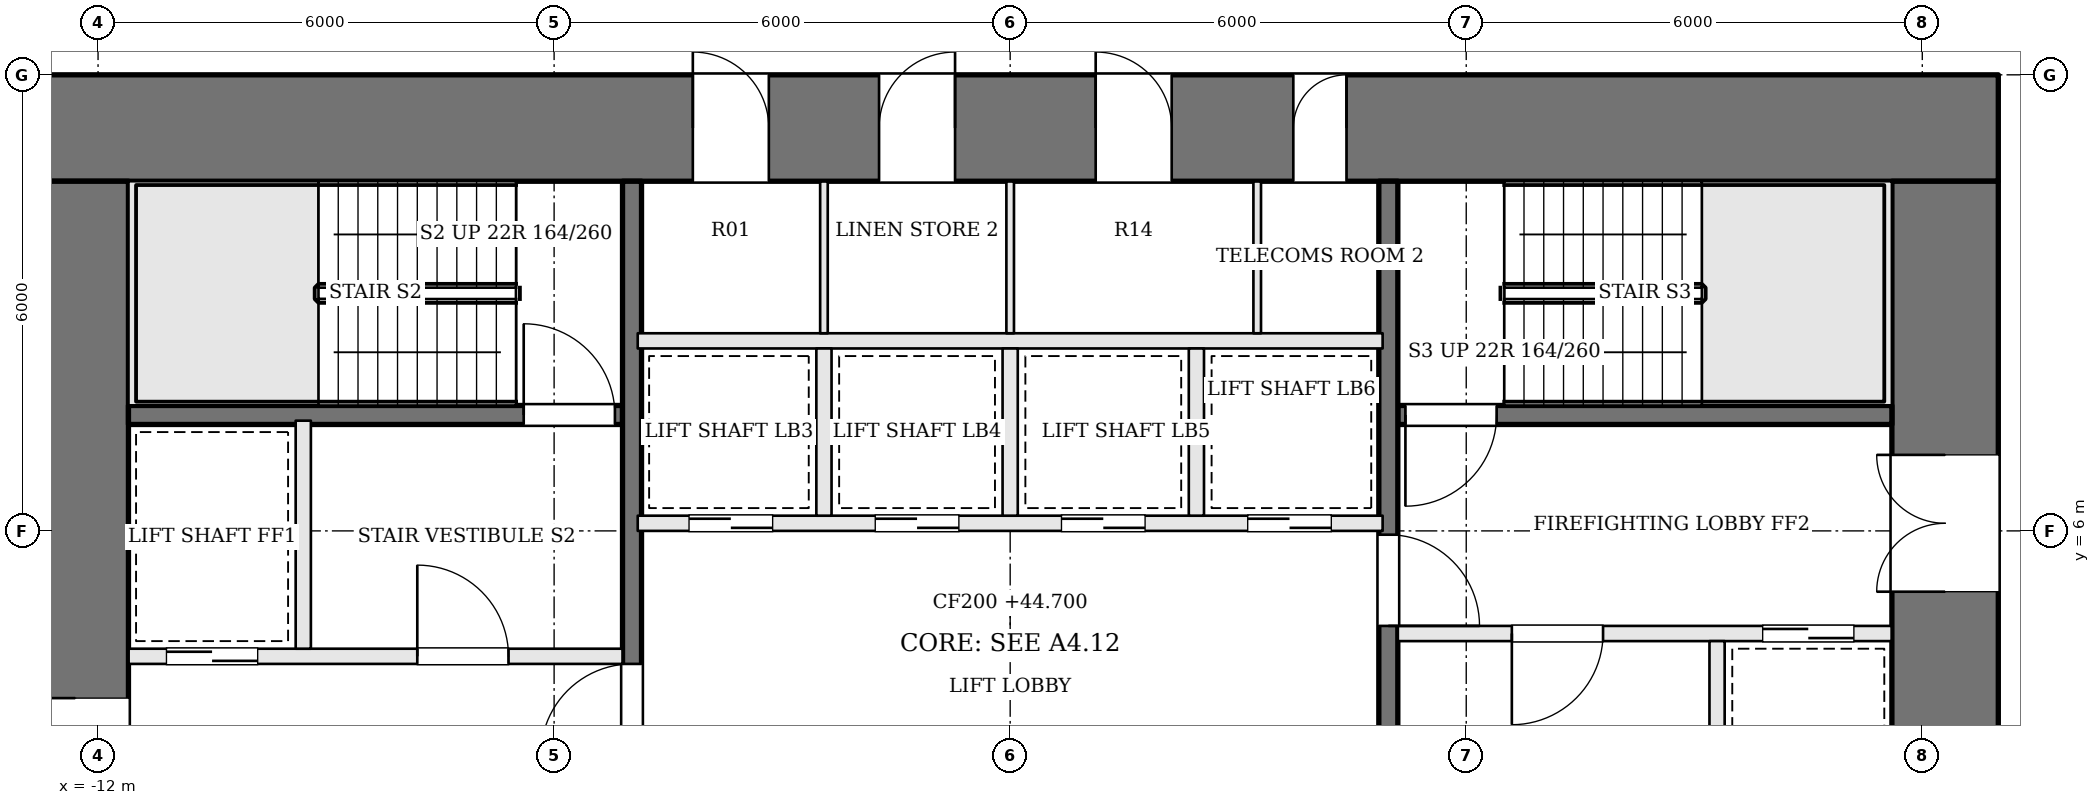
"""IFC4 building model, lengths in metres.
Left out: names, types, materials, properties, quantities, classifications, styles, units other than length and angle.
Written with IfcOpenShell. Run it as: python <this file> out.ifc"""

import sys

from ifc_helpers import new_model, si_unit, direction, frame, frame_2d, origin, place, context, subcontext, project, spatial, rectangle, extrude, element, fill, save


model = new_model("IFC4")
c1 = context("Model", 3, precision=1e-05, world=origin(), true_north=direction((0.0, 1.0)))
c2 = subcontext(c1, "Body", "Model", "MODEL_VIEW")
j1 = project(units=[si_unit("LENGTHUNIT", "METRE"), si_unit("PLANEANGLEUNIT", "RADIAN")], contexts=[c1])
p1 = place(None, origin())
s1 = spatial("IfcSite", under=j1, at=p1, CompositionType="ELEMENT")
p2 = place(p1, origin())
s2 = spatial("IfcBuilding", under=s1, at=p2, CompositionType="ELEMENT")
p3 = place(p2, frame((0.0, 0.0, 44.7)))
s3 = spatial("IfcBuildingStorey", under=s2, at=p3, CompositionType="ELEMENT", Elevation=44.7)
p4 = place(p3, frame((-13.0, 11.3, 0.0), z_axis=(0.0, 0.0, 1.0), x_axis=(1.0, 0.0, 0.0)))
e1 = element("IfcWall", 1, at=p4, inside=s3, PredefinedType="SHEAR", context=c2, shape_type="SweptSolid", body=[
    extrude(rectangle(XDim=26.0, YDim=1.4, at=frame_2d((13.0, 0.0))), origin(), (0.0, 0.0, 1.0), 3.6),
])
p5 = place(p4, frame((8.825, 0.0, 0.0)))
e2 = element("IfcOpeningElement", 2, at=p5, cuts=e1, PredefinedType="OPENING", context=c2, shape_type="SweptSolid", body=[
    extrude(rectangle(XDim=1.0, YDim=2.1, at=frame_2d((0.5, 1.05))), frame((0.0, 0.71, 0.0), z_axis=(0.0, -1.0, 0.0), x_axis=(1.0, 0.0, 0.0)), (0.0, 0.0, 1.0), 1.42),
])
p6 = place(p4, frame((11.275, 0.0, 0.0)))
e3 = element("IfcOpeningElement", 3, at=p6, cuts=e1, PredefinedType="OPENING", context=c2, shape_type="SweptSolid", body=[
    extrude(rectangle(XDim=1.0, YDim=2.1, at=frame_2d((0.5, 1.05))), frame((0.0, 0.71, 0.0), z_axis=(0.0, -1.0, 0.0), x_axis=(1.0, 0.0, 0.0)), (0.0, 0.0, 1.0), 1.42),
])
p7 = place(p4, frame((14.125, 0.0, 0.0)))
e4 = element("IfcOpeningElement", 4, at=p7, cuts=e1, PredefinedType="OPENING", context=c2, shape_type="SweptSolid", body=[
    extrude(rectangle(XDim=1.0, YDim=2.1, at=frame_2d((0.5, 1.05))), frame((0.0, 0.71, 0.0), z_axis=(0.0, -1.0, 0.0), x_axis=(1.0, 0.0, 0.0)), (0.0, 0.0, 1.0), 1.42),
])
p8 = place(p4, frame((16.725, 0.0, 0.0)))
e5 = element("IfcOpeningElement", 5, at=p8, cuts=e1, PredefinedType="OPENING", context=c2, shape_type="SweptSolid", body=[
    extrude(rectangle(XDim=0.7, YDim=2.1, at=frame_2d((0.35, 1.05))), frame((0.0, 0.71, 0.0), z_axis=(0.0, -1.0, 0.0), x_axis=(1.0, 0.0, 0.0)), (0.0, 0.0, 1.0), 1.42),
])
p9 = place(p3, frame((12.3, -1.6, 0.0), z_axis=(0.0, 0.0, 1.0), x_axis=(0.0, 1.0, 0.0)))
e6 = element("IfcWall", 6, at=p9, inside=s3, PredefinedType="SHEAR", context=c2, shape_type="SweptSolid", body=[
    extrude(rectangle(XDim=12.2, YDim=1.4, at=frame_2d((6.1, 0.0))), origin(), (0.0, 0.0, 1.0), 3.6),
])
p10 = place(p9, frame((6.8, 0.0, 0.0)))
e7 = element("IfcOpeningElement", 7, at=p10, cuts=e6, PredefinedType="OPENING", context=c2, shape_type="SweptSolid", body=[
    extrude(rectangle(XDim=1.8, YDim=2.1, at=frame_2d((0.9, 1.05))), frame((0.0, 0.71, 0.0), z_axis=(0.0, -1.0, 0.0), x_axis=(1.0, 0.0, 0.0)), (0.0, 0.0, 1.0), 1.42),
])
p11 = place(p3, frame((-12.3, -1.6, 0.0), z_axis=(0.0, 0.0, 1.0), x_axis=(0.0, 1.0, 0.0)))
e8 = element("IfcWall", 8, at=p11, inside=s3, PredefinedType="SHEAR", context=c2, shape_type="SweptSolid", body=[
    extrude(rectangle(XDim=12.2, YDim=1.4, at=frame_2d((6.1, 0.0))), origin(), (0.0, 0.0, 1.0), 3.6),
])
p12 = place(p11, frame((3.6, 0.0, 0.0)))
e9 = element("IfcOpeningElement", 9, at=p12, cuts=e8, PredefinedType="OPENING", context=c2, shape_type="SweptSolid", body=[
    extrude(rectangle(XDim=1.8, YDim=2.1, at=frame_2d((0.9, 1.05))), frame((0.0, 0.71, 0.0), z_axis=(0.0, -1.0, 0.0), x_axis=(1.0, 0.0, 0.0)), (0.0, 0.0, 1.0), 1.42),
])
p13 = place(p3, frame((11.6, 7.525, 0.0), z_axis=(0.0, 0.0, 1.0), x_axis=(-1.0, 0.0, 0.0)))
e10 = element("IfcWall", 10, at=p13, inside=s3, PredefinedType="SOLIDWALL", context=c2, shape_type="SweptSolid", body=[
    extrude(rectangle(XDim=6.5, YDim=0.25, at=frame_2d((3.25, 0.0))), origin(), (0.0, 0.0, 1.0), 3.4),
])
p14 = place(p13, frame((5.2, 0.0, 0.0)))
e11 = element("IfcOpeningElement", 11, at=p14, cuts=e10, PredefinedType="OPENING", context=c2, shape_type="SweptSolid", body=[
    extrude(rectangle(XDim=1.2, YDim=2.1, at=frame_2d((0.6, 1.05))), frame((0.0, 0.135, 0.0), z_axis=(0.0, -1.0, 0.0), x_axis=(1.0, 0.0, 0.0)), (0.0, 0.0, 1.0), 0.27),
])
p15 = place(p3, frame((-11.6, 4.35, 0.0), z_axis=(0.0, 0.0, 1.0), x_axis=(1.0, 0.0, 0.0)))
e12 = element("IfcWall", 12, at=p15, inside=s3, PredefinedType="SOLIDWALL", context=c2, shape_type="SweptSolid", body=[
    extrude(rectangle(XDim=6.5, YDim=0.2, at=frame_2d((3.25, 0.0))), origin(), (0.0, 0.0, 1.0), 3.4),
])
p16 = place(p15, frame((3.8, 0.0, 0.0)))
e13 = element("IfcOpeningElement", 13, at=p16, cuts=e12, PredefinedType="OPENING", context=c2, shape_type="SweptSolid", body=[
    extrude(rectangle(XDim=1.2, YDim=2.1, at=frame_2d((0.6, 1.05))), frame((0.0, 0.11, 0.0), z_axis=(0.0, -1.0, 0.0), x_axis=(1.0, 0.0, 0.0)), (0.0, 0.0, 1.0), 0.22),
])
p17 = place(p15, frame((0.5, 0.0, 0.0)))
e14 = element("IfcOpeningElement", 14, at=p17, cuts=e12, PredefinedType="OPENING", context=c2, shape_type="SweptSolid", body=[
    extrude(rectangle(XDim=1.2, YDim=2.1, at=frame_2d((0.6, 1.05))), frame((0.0, 0.11, 0.0), z_axis=(0.0, -1.0, 0.0), x_axis=(1.0, 0.0, 0.0)), (0.0, 0.0, 1.0), 0.22),
])
p18 = place(p3, frame((11.6, 4.65, 0.0), z_axis=(0.0, 0.0, 1.0), x_axis=(-1.0, 0.0, 0.0)))
e15 = element("IfcWall", 15, at=p18, inside=s3, PredefinedType="SOLIDWALL", context=c2, shape_type="SweptSolid", body=[
    extrude(rectangle(XDim=6.5, YDim=0.2, at=frame_2d((3.25, 0.0))), origin(), (0.0, 0.0, 1.0), 3.4),
])
p19 = place(p18, frame((3.8, 0.0, 0.0)))
e16 = element("IfcOpeningElement", 16, at=p19, cuts=e15, PredefinedType="OPENING", context=c2, shape_type="SweptSolid", body=[
    extrude(rectangle(XDim=1.2, YDim=2.1, at=frame_2d((0.6, 1.05))), frame((0.0, 0.11, 0.0), z_axis=(0.0, -1.0, 0.0), x_axis=(1.0, 0.0, 0.0)), (0.0, 0.0, 1.0), 0.22),
])
p20 = place(p18, frame((0.5, 0.0, 0.0)))
e17 = element("IfcOpeningElement", 17, at=p20, cuts=e15, PredefinedType="OPENING", context=c2, shape_type="SweptSolid", body=[
    extrude(rectangle(XDim=1.2, YDim=2.1, at=frame_2d((0.6, 1.05))), frame((0.0, 0.11, 0.0), z_axis=(0.0, -1.0, 0.0), x_axis=(1.0, 0.0, 0.0)), (0.0, 0.0, 1.0), 0.22),
])
p21 = place(p3, frame((-11.6, 7.525, 0.0), z_axis=(0.0, 0.0, 1.0), x_axis=(1.0, 0.0, 0.0)))
e18 = element("IfcWall", 18, at=p21, inside=s3, PredefinedType="SOLIDWALL", context=c2, shape_type="SweptSolid", body=[
    extrude(rectangle(XDim=6.5, YDim=0.25, at=frame_2d((3.25, 0.0))), origin(), (0.0, 0.0, 1.0), 3.4),
])
p22 = place(p21, frame((5.2, 0.0, 0.0)))
e19 = element("IfcOpeningElement", 19, at=p22, cuts=e18, PredefinedType="OPENING", context=c2, shape_type="SweptSolid", body=[
    extrude(rectangle(XDim=1.2, YDim=2.1, at=frame_2d((0.6, 1.05))), frame((0.0, 0.135, 0.0), z_axis=(0.0, -1.0, 0.0), x_axis=(1.0, 0.0, 0.0)), (0.0, 0.0, 1.0), 0.27),
])
for number, where, z_axis, x_axis in (
    (20, (-9.3, 4.45, 0.0), (0.0, 0.0, 1.0), (0.0, 1.0, 0.0)),
    (21, (9.3, 4.55, 0.0), (0.0, 0.0, 1.0), (0.0, -1.0, 0.0)),
):
    element("IfcWall", number, at=place(p3, frame(where, z_axis=z_axis, x_axis=x_axis)), inside=s3, PredefinedType="SOLIDWALL", context=c2, shape_type="SweptSolid", body=[
        extrude(rectangle(XDim=3.0, YDim=0.2, at=frame_2d((1.5, 0.0))), origin(), (0.0, 0.0, 1.0), 3.4),
    ])
p23 = place(p3, frame((-4.975, -1.6, 0.0), z_axis=(0.0, 0.0, 1.0), x_axis=(0.0, 1.0, 0.0)))
e22 = element("IfcWall", 22, at=p23, inside=s3, PredefinedType="SOLIDWALL", context=c2, shape_type="SweptSolid", body=[
    extrude(rectangle(XDim=12.2, YDim=0.25, at=frame_2d((6.1, 0.0))), origin(), (0.0, 0.0, 1.0), 3.4),
])
p24 = place(p23, frame((4.65, 0.0, 0.0)))
e23 = element("IfcOpeningElement", 23, at=p24, cuts=e22, PredefinedType="OPENING", context=c2, shape_type="SweptSolid", body=[
    extrude(rectangle(XDim=1.2, YDim=2.1, at=frame_2d((0.6, 1.05))), frame((0.0, 0.135, 0.0), z_axis=(0.0, -1.0, 0.0), x_axis=(1.0, 0.0, 0.0)), (0.0, 0.0, 1.0), 0.27),
])
p25 = place(p3, frame((4.975, 10.6, 0.0), z_axis=(0.0, 0.0, 1.0), x_axis=(0.0, -1.0, 0.0)))
e24 = element("IfcWall", 24, at=p25, inside=s3, PredefinedType="SOLIDWALL", context=c2, shape_type="SweptSolid", body=[
    extrude(rectangle(XDim=12.2, YDim=0.25, at=frame_2d((6.1, 0.0))), origin(), (0.0, 0.0, 1.0), 3.4),
])
p26 = place(p25, frame((4.65, 0.0, 0.0)))
e25 = element("IfcOpeningElement", 25, at=p26, cuts=e24, PredefinedType="OPENING", context=c2, shape_type="SweptSolid", body=[
    extrude(rectangle(XDim=1.2, YDim=2.1, at=frame_2d((0.6, 1.05))), frame((0.0, 0.135, 0.0), z_axis=(0.0, -1.0, 0.0), x_axis=(1.0, 0.0, 0.0)), (0.0, 0.0, 1.0), 0.27),
])
p27 = place(p3, frame((-4.9, 6.1, 0.0), z_axis=(0.0, 0.0, 1.0), x_axis=(1.0, 0.0, 0.0)))
e26 = element("IfcWall", 26, at=p27, inside=s3, PredefinedType="SOLIDWALL", context=c2, shape_type="SweptSolid", body=[
    extrude(rectangle(XDim=9.8, YDim=0.2, at=frame_2d((4.9, 0.0))), origin(), (0.0, 0.0, 1.0), 3.4),
])
p28 = place(p27, frame((0.675, 0.0, 0.0)))
e27 = element("IfcOpeningElement", 27, at=p28, cuts=e26, PredefinedType="OPENING", context=c2, shape_type="SweptSolid", body=[
    extrude(rectangle(XDim=1.1, YDim=2.1, at=frame_2d((0.55, 1.05))), frame((0.0, 0.11, 0.0), z_axis=(0.0, -1.0, 0.0), x_axis=(1.0, 0.0, 0.0)), (0.0, 0.0, 1.0), 0.22),
])
p29 = place(p27, frame((3.125, 0.0, 0.0)))
e28 = element("IfcOpeningElement", 28, at=p29, cuts=e26, PredefinedType="OPENING", context=c2, shape_type="SweptSolid", body=[
    extrude(rectangle(XDim=1.1, YDim=2.1, at=frame_2d((0.55, 1.05))), frame((0.0, 0.11, 0.0), z_axis=(0.0, -1.0, 0.0), x_axis=(1.0, 0.0, 0.0)), (0.0, 0.0, 1.0), 0.22),
])
p30 = place(p27, frame((5.575, 0.0, 0.0)))
e29 = element("IfcOpeningElement", 29, at=p30, cuts=e26, PredefinedType="OPENING", context=c2, shape_type="SweptSolid", body=[
    extrude(rectangle(XDim=1.1, YDim=2.1, at=frame_2d((0.55, 1.05))), frame((0.0, 0.11, 0.0), z_axis=(0.0, -1.0, 0.0), x_axis=(1.0, 0.0, 0.0)), (0.0, 0.0, 1.0), 0.22),
])
p31 = place(p27, frame((8.025, 0.0, 0.0)))
e30 = element("IfcOpeningElement", 30, at=p31, cuts=e26, PredefinedType="OPENING", context=c2, shape_type="SweptSolid", body=[
    extrude(rectangle(XDim=1.1, YDim=2.1, at=frame_2d((0.55, 1.05))), frame((0.0, 0.11, 0.0), z_axis=(0.0, -1.0, 0.0), x_axis=(1.0, 0.0, 0.0)), (0.0, 0.0, 1.0), 0.22),
])
p32 = place(p3, frame((-4.9, 8.5, 0.0), z_axis=(0.0, 0.0, 1.0), x_axis=(1.0, 0.0, 0.0)))
e31 = element("IfcWall", 31, at=p32, inside=s3, PredefinedType="SOLIDWALL", context=c2, shape_type="SweptSolid", body=[
    extrude(rectangle(XDim=9.8, YDim=0.2, at=frame_2d((4.9, 0.0))), origin(), (0.0, 0.0, 1.0), 3.4),
])
for number, where, z_axis, x_axis in (
    (32, (-2.45, 6.2, 0.0), (0.0, 0.0, 1.0), (0.0, 1.0, 0.0)),
    (33, (0.0, 6.2, 0.0), (0.0, 0.0, 1.0), (0.0, 1.0, 0.0)),
    (34, (2.45, 6.2, 0.0), (0.0, 0.0, 1.0), (0.0, 1.0, 0.0)),
):
    element("IfcWall", number, at=place(p3, frame(where, z_axis=z_axis, x_axis=x_axis)), inside=s3, PredefinedType="SOLIDWALL", context=c2, shape_type="SweptSolid", body=[
        extrude(rectangle(XDim=2.2, YDim=0.2, at=frame_2d((1.1, 0.0))), origin(), (0.0, 0.0, 1.0), 3.4),
    ])
for number, where, z_axis, x_axis in (
    (35, (-2.45, 8.6, 0.0), (0.0, 0.0, 1.0), (0.0, 1.0, 0.0)),
    (36, (0.0, 8.6, 0.0), (0.0, 0.0, 1.0), (0.0, 1.0, 0.0)),
    (37, (3.25, 8.6, 0.0), (0.0, 0.0, 1.0), (0.0, 1.0, 0.0)),
):
    element("IfcWall", number, at=place(p3, frame(where, z_axis=z_axis, x_axis=x_axis)), inside=s3, PredefinedType="PARTITIONING", context=c2, shape_type="SweptSolid", body=[
        extrude(rectangle(XDim=2.0, YDim=0.1, at=frame_2d((1.0, 0.0))), origin(), (0.0, 0.0, 1.0), 3.4),
    ])
p33 = place(p12, origin())
e38 = element("IfcDoor", 38, at=p33, inside=s3, OperationType="DOUBLE_DOOR_SINGLE_SWING", PredefinedType="DOOR", context=c2, shape_type="SweptSolid", body=[
    extrude(rectangle(XDim=1.8, YDim=2.1, at=frame_2d((0.9, 1.05))), frame((0.0, 0.025, 0.0), z_axis=(0.0, -1.0, 0.0), x_axis=(1.0, 0.0, 0.0)), (0.0, 0.0, 1.0), 0.05),
])
fill(e9, e38)
p34 = place(p10, origin())
e39 = element("IfcDoor", 39, at=p34, inside=s3, OperationType="DOUBLE_DOOR_SINGLE_SWING", PredefinedType="DOOR", context=c2, shape_type="SweptSolid", body=[
    extrude(rectangle(XDim=1.8, YDim=2.1, at=frame_2d((0.9, 1.05))), frame((0.0, 0.025, 0.0), z_axis=(0.0, -1.0, 0.0), x_axis=(1.0, 0.0, 0.0)), (0.0, 0.0, 1.0), 0.05),
])
fill(e7, e39)
p35 = place(p24, origin())
e40 = element("IfcDoor", 40, at=p35, inside=s3, OperationType="SINGLE_SWING_LEFT", PredefinedType="DOOR", context=c2, shape_type="SweptSolid", body=[
    extrude(rectangle(XDim=1.2, YDim=2.1, at=frame_2d((0.6, 1.05))), frame((0.0, 0.025, 0.0), z_axis=(0.0, -1.0, 0.0), x_axis=(1.0, 0.0, 0.0)), (0.0, 0.0, 1.0), 0.05),
])
fill(e23, e40)
p36 = place(p26, origin())
e41 = element("IfcDoor", 41, at=p36, inside=s3, OperationType="SINGLE_SWING_RIGHT", PredefinedType="DOOR", context=c2, shape_type="SweptSolid", body=[
    extrude(rectangle(XDim=1.2, YDim=2.1, at=frame_2d((0.6, 1.05))), frame((0.0, 0.025, 0.0), z_axis=(0.0, -1.0, 0.0), x_axis=(1.0, 0.0, 0.0)), (0.0, 0.0, 1.0), 0.05),
])
fill(e25, e41)
p37 = place(p16, origin())
e42 = element("IfcDoor", 42, at=p37, inside=s3, OperationType="SINGLE_SWING_LEFT", PredefinedType="DOOR", context=c2, shape_type="SweptSolid", body=[
    extrude(rectangle(XDim=1.2, YDim=2.1, at=frame_2d((0.6, 1.05))), frame((0.0, 0.025, 0.0), z_axis=(0.0, -1.0, 0.0), x_axis=(1.0, 0.0, 0.0)), (0.0, 0.0, 1.0), 0.05),
])
fill(e13, e42)
p38 = place(p19, origin())
e43 = element("IfcDoor", 43, at=p38, inside=s3, OperationType="SINGLE_SWING_RIGHT", PredefinedType="DOOR", context=c2, shape_type="SweptSolid", body=[
    extrude(rectangle(XDim=1.2, YDim=2.1, at=frame_2d((0.6, 1.05))), frame((0.0, 0.025, 0.0), z_axis=(0.0, -1.0, 0.0), x_axis=(1.0, 0.0, 0.0)), (0.0, 0.0, 1.0), 0.05),
])
fill(e16, e43)
p39 = place(p14, origin())
e44 = element("IfcDoor", 44, at=p39, inside=s3, OperationType="SINGLE_SWING_RIGHT", PredefinedType="DOOR", context=c2, shape_type="SweptSolid", body=[
    extrude(rectangle(XDim=1.2, YDim=2.1, at=frame_2d((0.6, 1.05))), frame((0.0, 0.025, 0.0), z_axis=(0.0, -1.0, 0.0), x_axis=(1.0, 0.0, 0.0)), (0.0, 0.0, 1.0), 0.05),
])
fill(e11, e44)
p40 = place(p22, origin())
e45 = element("IfcDoor", 45, at=p40, inside=s3, OperationType="SINGLE_SWING_LEFT", PredefinedType="DOOR", context=c2, shape_type="SweptSolid", body=[
    extrude(rectangle(XDim=1.2, YDim=2.1, at=frame_2d((0.6, 1.05))), frame((0.0, 0.025, 0.0), z_axis=(0.0, -1.0, 0.0), x_axis=(1.0, 0.0, 0.0)), (0.0, 0.0, 1.0), 0.05),
])
fill(e19, e45)
p41 = place(p17, origin())
e46 = element("IfcDoor", 46, at=p41, inside=s3, OperationType="SLIDING_TO_RIGHT", PredefinedType="DOOR", context=c2, shape_type="SweptSolid", body=[
    extrude(rectangle(XDim=1.2, YDim=2.1, at=frame_2d((0.6, 1.05))), frame((0.0, 0.025, 0.0), z_axis=(0.0, -1.0, 0.0), x_axis=(1.0, 0.0, 0.0)), (0.0, 0.0, 1.0), 0.05),
])
fill(e14, e46)
p42 = place(p20, origin())
e47 = element("IfcDoor", 47, at=p42, inside=s3, OperationType="SLIDING_TO_RIGHT", PredefinedType="DOOR", context=c2, shape_type="SweptSolid", body=[
    extrude(rectangle(XDim=1.2, YDim=2.1, at=frame_2d((0.6, 1.05))), frame((0.0, 0.025, 0.0), z_axis=(0.0, -1.0, 0.0), x_axis=(1.0, 0.0, 0.0)), (0.0, 0.0, 1.0), 0.05),
])
fill(e17, e47)
p43 = place(p28, origin())
e48 = element("IfcDoor", 48, at=p43, inside=s3, OperationType="SLIDING_TO_RIGHT", PredefinedType="DOOR", context=c2, shape_type="SweptSolid", body=[
    extrude(rectangle(XDim=1.1, YDim=2.1, at=frame_2d((0.55, 1.05))), frame((0.0, 0.025, 0.0), z_axis=(0.0, -1.0, 0.0), x_axis=(1.0, 0.0, 0.0)), (0.0, 0.0, 1.0), 0.05),
])
fill(e27, e48)
p44 = place(p29, origin())
e49 = element("IfcDoor", 49, at=p44, inside=s3, OperationType="SLIDING_TO_LEFT", PredefinedType="DOOR", context=c2, shape_type="SweptSolid", body=[
    extrude(rectangle(XDim=1.1, YDim=2.1, at=frame_2d((0.55, 1.05))), frame((0.0, 0.025, 0.0), z_axis=(0.0, -1.0, 0.0), x_axis=(1.0, 0.0, 0.0)), (0.0, 0.0, 1.0), 0.05),
])
fill(e28, e49)
p45 = place(p30, origin())
e50 = element("IfcDoor", 50, at=p45, inside=s3, OperationType="SLIDING_TO_RIGHT", PredefinedType="DOOR", context=c2, shape_type="SweptSolid", body=[
    extrude(rectangle(XDim=1.1, YDim=2.1, at=frame_2d((0.55, 1.05))), frame((0.0, 0.025, 0.0), z_axis=(0.0, -1.0, 0.0), x_axis=(1.0, 0.0, 0.0)), (0.0, 0.0, 1.0), 0.05),
])
fill(e29, e50)
p46 = place(p31, origin())
e51 = element("IfcDoor", 51, at=p46, inside=s3, OperationType="SLIDING_TO_LEFT", PredefinedType="DOOR", context=c2, shape_type="SweptSolid", body=[
    extrude(rectangle(XDim=1.1, YDim=2.1, at=frame_2d((0.55, 1.05))), frame((0.0, 0.025, 0.0), z_axis=(0.0, -1.0, 0.0), x_axis=(1.0, 0.0, 0.0)), (0.0, 0.0, 1.0), 0.05),
])
fill(e30, e51)
p47 = place(p5, origin())
e52 = element("IfcDoor", 52, at=p47, inside=s3, OperationType="SINGLE_SWING_LEFT", PredefinedType="DOOR", context=c2, shape_type="SweptSolid", body=[
    extrude(rectangle(XDim=1.0, YDim=2.1, at=frame_2d((0.5, 1.05))), frame((0.0, 0.025, 0.0), z_axis=(0.0, -1.0, 0.0), x_axis=(1.0, 0.0, 0.0)), (0.0, 0.0, 1.0), 0.05),
])
fill(e2, e52)
p48 = place(p6, origin())
e53 = element("IfcDoor", 53, at=p48, inside=s3, OperationType="SINGLE_SWING_RIGHT", PredefinedType="DOOR", context=c2, shape_type="SweptSolid", body=[
    extrude(rectangle(XDim=1.0, YDim=2.1, at=frame_2d((0.5, 1.05))), frame((0.0, 0.025, 0.0), z_axis=(0.0, -1.0, 0.0), x_axis=(1.0, 0.0, 0.0)), (0.0, 0.0, 1.0), 0.05),
])
fill(e3, e53)
p49 = place(p7, origin())
e54 = element("IfcDoor", 54, at=p49, inside=s3, OperationType="SINGLE_SWING_LEFT", PredefinedType="DOOR", context=c2, shape_type="SweptSolid", body=[
    extrude(rectangle(XDim=1.0, YDim=2.1, at=frame_2d((0.5, 1.05))), frame((0.0, 0.025, 0.0), z_axis=(0.0, -1.0, 0.0), x_axis=(1.0, 0.0, 0.0)), (0.0, 0.0, 1.0), 0.05),
])
fill(e4, e54)
p50 = place(p8, origin())
e55 = element("IfcDoor", 55, at=p50, inside=s3, OperationType="SINGLE_SWING_RIGHT", PredefinedType="DOOR", context=c2, shape_type="SweptSolid", body=[
    extrude(rectangle(XDim=0.7, YDim=2.1, at=frame_2d((0.35, 1.05))), frame((0.0, 0.025, 0.0), z_axis=(0.0, -1.0, 0.0), x_axis=(1.0, 0.0, 0.0)), (0.0, 0.0, 1.0), 0.05),
])
fill(e5, e55)
save(model, sys.argv[1])
